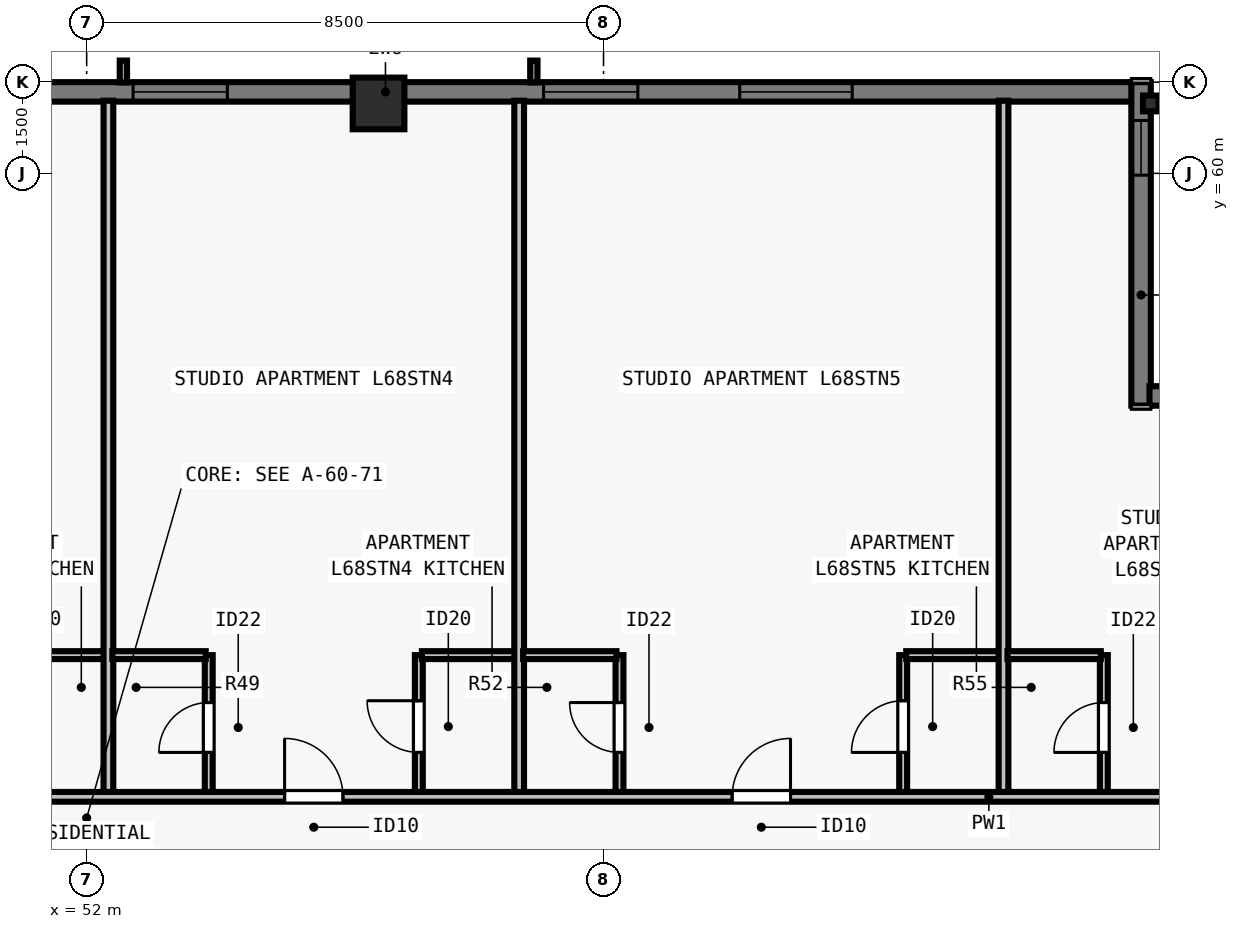
"""IFC4 building model, lengths in metres.
Left out: names, types, materials, properties, quantities, classifications, styles, units other than length and angle.
Written with IfcOpenShell. Run it as: python <this file> out.ifc"""

import sys

from ifc_helpers import new_model, si_unit, direction, frame, frame_2d, origin, origin_2d, place, context, subcontext, project, spatial, rectangle, i_section, extrude, element, fill, save


model = new_model("IFC4")
c1 = context("Model", 3, precision=1e-05, world=origin(), true_north=direction((0.0, 1.0)))
c2 = subcontext(c1, "Body", "Model", "MODEL_VIEW")
j1 = project(units=[si_unit("LENGTHUNIT", "METRE"), si_unit("PLANEANGLEUNIT", "RADIAN")], contexts=[c1])
p1 = place(None, origin())
s1 = spatial("IfcSite", under=j1, at=p1, CompositionType="ELEMENT")
p2 = place(p1, origin())
s2 = spatial("IfcBuilding", under=s1, at=p2, CompositionType="ELEMENT")
p3 = place(p2, frame((0.0, 0.0, 248.0)))
s3 = spatial("IfcBuildingStorey", under=s2, at=p3, CompositionType="ELEMENT", Elevation=248.0)
p4 = place(p3, frame((69.5, 61.15, 0.0), z_axis=(0.0, 0.0, 1.0), x_axis=(1.0, 0.0, 0.0)))
e1 = element("IfcColumn", 1, at=p4, inside=s3, PredefinedType="COLUMN", context=c2, shape_type="SweptSolid", body=[
    extrude(i_section(OverallWidth=0.256, OverallDepth=0.26, WebThickness=0.01, FlangeThickness=0.017, FilletRadius=0.013, at=origin_2d()), origin(), (0.0, 0.0, 1.0), 3.5),
])
p5 = place(p3, frame((56.8, 61.15, 0.0), z_axis=(0.0, 0.0, 1.0), x_axis=(1.0, 0.0, 0.0)))
e2 = element("IfcColumn", 2, at=p5, inside=s3, PredefinedType="COLUMN", context=c2, shape_type="SweptSolid", body=[
    extrude(rectangle(XDim=0.85, YDim=0.85, at=origin_2d()), origin(), (0.0, 0.0, 1.0), 3.5),
])
p6 = place(p3, frame((34.5, 61.34, 0.0), z_axis=(0.0, 0.0, 1.0), x_axis=(1.0, 0.0, 0.0)))
e3 = element("IfcWall", 3, at=p6, inside=s3, PredefinedType="SOLIDWALL", context=c2, shape_type="SweptSolid", body=[
    extrude(rectangle(XDim=34.702, YDim=0.32, at=frame_2d((17.351, 0.0))), origin(), (0.0, 0.0, 1.0), 3.29),
])
p7 = place(p6, frame((4.763, 0.0, 0.8)))
e4 = element("IfcOpeningElement", 4, at=p7, cuts=e3, PredefinedType="OPENING", context=c2, shape_type="SweptSolid", body=[
    extrude(rectangle(XDim=1.55, YDim=1.678, at=frame_2d((0.775, 0.839))), frame((0.0, 0.17, 0.0), z_axis=(0.0, -1.0, 0.0), x_axis=(1.0, 0.0, 0.0)), (0.0, 0.0, 1.0), 0.34),
])
p8 = place(p6, frame((7.538, 0.0, 0.8)))
e5 = element("IfcOpeningElement", 5, at=p8, cuts=e3, PredefinedType="OPENING", context=c2, shape_type="SweptSolid", body=[
    extrude(rectangle(XDim=1.85, YDim=1.678, at=frame_2d((0.925, 0.839))), frame((0.0, 0.17, 0.0), z_axis=(0.0, -1.0, 0.0), x_axis=(1.0, 0.0, 0.0)), (0.0, 0.0, 1.0), 0.34),
])
p9 = place(p6, frame((10.263, 0.0, 0.8)))
e6 = element("IfcOpeningElement", 6, at=p9, cuts=e3, PredefinedType="OPENING", context=c2, shape_type="SweptSolid", body=[
    extrude(rectangle(XDim=1.55, YDim=1.678, at=frame_2d((0.775, 0.839))), frame((0.0, 0.17, 0.0), z_axis=(0.0, -1.0, 0.0), x_axis=(1.0, 0.0, 0.0)), (0.0, 0.0, 1.0), 0.34),
])
p10 = place(p6, frame((14.738, 0.0, 0.8)))
e7 = element("IfcOpeningElement", 7, at=p10, cuts=e3, PredefinedType="OPENING", context=c2, shape_type="SweptSolid", body=[
    extrude(rectangle(XDim=1.85, YDim=1.678, at=frame_2d((0.925, 0.839))), frame((0.0, 0.17, 0.0), z_axis=(0.0, -1.0, 0.0), x_axis=(1.0, 0.0, 0.0)), (0.0, 0.0, 1.0), 0.34),
])
p11 = place(p6, frame((18.264, 0.0, 0.8)))
e8 = element("IfcOpeningElement", 8, at=p11, cuts=e3, PredefinedType="OPENING", context=c2, shape_type="SweptSolid", body=[
    extrude(rectangle(XDim=1.55, YDim=1.678, at=frame_2d((0.775, 0.839))), frame((0.0, 0.17, 0.0), z_axis=(0.0, -1.0, 0.0), x_axis=(1.0, 0.0, 0.0)), (0.0, 0.0, 1.0), 0.34),
])
p12 = place(p6, frame((25.014, 0.0, 0.8)))
e9 = element("IfcOpeningElement", 9, at=p12, cuts=e3, PredefinedType="OPENING", context=c2, shape_type="SweptSolid", body=[
    extrude(rectangle(XDim=1.55, YDim=1.678, at=frame_2d((0.775, 0.839))), frame((0.0, 0.17, 0.0), z_axis=(0.0, -1.0, 0.0), x_axis=(1.0, 0.0, 0.0)), (0.0, 0.0, 1.0), 0.34),
])
p13 = place(p6, frame((28.24, 0.0, 0.8)))
e10 = element("IfcOpeningElement", 10, at=p13, cuts=e3, PredefinedType="OPENING", context=c2, shape_type="SweptSolid", body=[
    extrude(rectangle(XDim=1.85, YDim=1.678, at=frame_2d((0.925, 0.839))), frame((0.0, 0.17, 0.0), z_axis=(0.0, -1.0, 0.0), x_axis=(1.0, 0.0, 0.0)), (0.0, 0.0, 1.0), 0.34),
])
p14 = place(p3, frame((69.34, 61.5, 0.0), z_axis=(0.0, 0.0, 1.0), x_axis=(0.0, -1.0, 0.0)))
e11 = element("IfcWall", 11, at=p14, inside=s3, PredefinedType="SOLIDWALL", context=c2, shape_type="SweptSolid", body=[
    extrude(rectangle(XDim=5.32, YDim=0.32, at=frame_2d((2.66, 0.0))), origin(), (0.0, 0.0, 1.0), 3.29),
])
p15 = place(p14, frame((0.63, 0.0, 0.8)))
e12 = element("IfcOpeningElement", 12, at=p15, cuts=e11, PredefinedType="OPENING", context=c2, shape_type="SweptSolid", body=[
    extrude(rectangle(XDim=0.9, YDim=1.678, at=frame_2d((0.45, 0.839))), frame((0.0, 0.17, 0.0), z_axis=(0.0, -1.0, 0.0), x_axis=(1.0, 0.0, 0.0)), (0.0, 0.0, 1.0), 0.34),
])
p16 = place(p3, frame((69.478, 56.34, 0.0), z_axis=(0.0, 0.0, 1.0), x_axis=(1.0, 0.0, 0.0)))
e13 = element("IfcWall", 13, at=p16, inside=s3, PredefinedType="SOLIDWALL", context=c2, shape_type="SweptSolid", body=[
    extrude(rectangle(XDim=4.724, YDim=0.32, at=frame_2d((2.362, 0.0))), origin(), (0.0, 0.0, 1.0), 3.29),
])
p17 = place(p3, frame((29.805, 49.748, 0.0), z_axis=(0.0, 0.0, 1.0), x_axis=(1.0, 0.0, 0.0)))
e14 = element("IfcWall", 14, at=p17, inside=s3, PredefinedType="PARTITIONING", context=c2, shape_type="SweptSolid", body=[
    extrude(rectangle(XDim=44.39, YDim=0.16, at=frame_2d((22.195, 0.0))), origin(), (0.0, 0.0, 1.0), 2.958),
])
p18 = place(p17, frame((3.494, 0.0, 0.0)))
e15 = element("IfcOpeningElement", 15, at=p18, cuts=e14, PredefinedType="OPENING", context=c2, shape_type="SweptSolid", body=[
    extrude(rectangle(XDim=0.96, YDim=2.18, at=frame_2d((0.48, 1.09))), frame((0.0, 0.09, 0.0), z_axis=(0.0, -1.0, 0.0), x_axis=(1.0, 0.0, 0.0)), (0.0, 0.0, 1.0), 0.18),
])
p19 = place(p17, frame((10.73, 0.0, 0.0)))
e16 = element("IfcOpeningElement", 16, at=p19, cuts=e14, PredefinedType="OPENING", context=c2, shape_type="SweptSolid", body=[
    extrude(rectangle(XDim=0.96, YDim=2.18, at=frame_2d((0.48, 1.09))), frame((0.0, 0.09, 0.0), z_axis=(0.0, -1.0, 0.0), x_axis=(1.0, 0.0, 0.0)), (0.0, 0.0, 1.0), 0.18),
])
p20 = place(p17, frame((18.09, 0.0, 0.0)))
e17 = element("IfcOpeningElement", 17, at=p20, cuts=e14, PredefinedType="OPENING", context=c2, shape_type="SweptSolid", body=[
    extrude(rectangle(XDim=0.96, YDim=2.18, at=frame_2d((0.48, 1.09))), frame((0.0, 0.09, 0.0), z_axis=(0.0, -1.0, 0.0), x_axis=(1.0, 0.0, 0.0)), (0.0, 0.0, 1.0), 0.18),
])
p21 = place(p17, frame((25.45, 0.0, 0.0)))
e18 = element("IfcOpeningElement", 18, at=p21, cuts=e14, PredefinedType="OPENING", context=c2, shape_type="SweptSolid", body=[
    extrude(rectangle(XDim=0.96, YDim=2.18, at=frame_2d((0.48, 1.09))), frame((0.0, 0.09, 0.0), z_axis=(0.0, -1.0, 0.0), x_axis=(1.0, 0.0, 0.0)), (0.0, 0.0, 1.0), 0.18),
])
p22 = place(p17, frame((32.81, 0.0, 0.0)))
e19 = element("IfcOpeningElement", 19, at=p22, cuts=e14, PredefinedType="OPENING", context=c2, shape_type="SweptSolid", body=[
    extrude(rectangle(XDim=0.96, YDim=2.18, at=frame_2d((0.48, 1.09))), frame((0.0, 0.09, 0.0), z_axis=(0.0, -1.0, 0.0), x_axis=(1.0, 0.0, 0.0)), (0.0, 0.0, 1.0), 0.18),
])
p23 = place(p17, frame((40.294, 0.0, 0.0)))
e20 = element("IfcOpeningElement", 20, at=p23, cuts=e14, PredefinedType="OPENING", context=c2, shape_type="SweptSolid", body=[
    extrude(rectangle(XDim=0.96, YDim=2.18, at=frame_2d((0.48, 1.09))), frame((0.0, 0.09, 0.0), z_axis=(0.0, -1.0, 0.0), x_axis=(1.0, 0.0, 0.0)), (0.0, 0.0, 1.0), 0.18),
])
p24 = place(p3, frame((50.758, 52.077, 0.0), z_axis=(0.0, 0.0, 1.0), x_axis=(1.0, 0.0, 0.0)))
e21 = element("IfcWall", 21, at=p24, inside=s3, PredefinedType="PLUMBINGWALL", context=c2, shape_type="SweptSolid", body=[
    extrude(rectangle(XDim=1.6, YDim=0.13, at=frame_2d((0.8, 0.0))), origin(), (0.0, 0.0, 1.0), 3.29),
])
p25 = place(p3, frame((52.357, 49.827, 0.0), z_axis=(0.0, 0.0, 1.0), x_axis=(0.0, 1.0, 0.0)))
e22 = element("IfcWall", 22, at=p25, inside=s3, PredefinedType="PARTITIONING", context=c2, shape_type="SweptSolid", body=[
    extrude(rectangle(XDim=11.368, YDim=0.16, at=frame_2d((5.684, 0.0))), origin(), (0.0, 0.0, 1.0), 2.958),
])
p26 = place(p3, frame((54.008, 49.827, 0.0), z_axis=(0.0, 0.0, 1.0), x_axis=(0.0, 1.0, 0.0)))
e23 = element("IfcWall", 23, at=p26, inside=s3, PredefinedType="PLUMBINGWALL", context=c2, shape_type="SweptSolid", body=[
    extrude(rectangle(XDim=2.25, YDim=0.13, at=frame_2d((1.125, 0.0))), origin(), (0.0, 0.0, 1.0), 3.29),
])
p27 = place(p26, frame((0.65, 0.0, 0.0)))
e24 = element("IfcOpeningElement", 24, at=p27, cuts=e23, PredefinedType="OPENING", context=c2, shape_type="SweptSolid", body=[
    extrude(rectangle(XDim=0.82, YDim=2.1, at=frame_2d((0.41, 1.05))), frame((0.0, 0.075, 0.0), z_axis=(0.0, -1.0, 0.0), x_axis=(1.0, 0.0, 0.0)), (0.0, 0.0, 1.0), 0.15),
])
p28 = place(p3, frame((52.423, 52.077, 0.0), z_axis=(0.0, 0.0, 1.0), x_axis=(1.0, 0.0, 0.0)))
e25 = element("IfcWall", 25, at=p28, inside=s3, PredefinedType="PLUMBINGWALL", context=c2, shape_type="SweptSolid", body=[
    extrude(rectangle(XDim=1.535, YDim=0.13, at=frame_2d((0.768, 0.0))), origin(), (0.0, 0.0, 1.0), 3.29),
])
p29 = place(p3, frame((57.462, 49.827, 0.0), z_axis=(0.0, 0.0, 1.0), x_axis=(0.0, 1.0, 0.0)))
e26 = element("IfcWall", 26, at=p29, inside=s3, PredefinedType="PLUMBINGWALL", context=c2, shape_type="SweptSolid", body=[
    extrude(rectangle(XDim=2.25, YDim=0.13, at=frame_2d((1.125, 0.0))), origin(), (0.0, 0.0, 1.0), 3.29),
])
p30 = place(p29, frame((0.65, 0.0, 0.0)))
e27 = element("IfcOpeningElement", 27, at=p30, cuts=e26, PredefinedType="OPENING", context=c2, shape_type="SweptSolid", body=[
    extrude(rectangle(XDim=0.85, YDim=2.1, at=frame_2d((0.425, 1.05))), frame((0.0, 0.075, 0.0), z_axis=(0.0, -1.0, 0.0), x_axis=(1.0, 0.0, 0.0)), (0.0, 0.0, 1.0), 0.15),
])
p31 = place(p3, frame((57.512, 52.077, 0.0), z_axis=(0.0, 0.0, 1.0), x_axis=(1.0, 0.0, 0.0)))
e28 = element("IfcWall", 28, at=p31, inside=s3, PredefinedType="PLUMBINGWALL", context=c2, shape_type="SweptSolid", body=[
    extrude(rectangle(XDim=1.6, YDim=0.13, at=frame_2d((0.8, 0.0))), origin(), (0.0, 0.0, 1.0), 3.29),
])
p32 = place(p3, frame((59.113, 49.827, 0.0), z_axis=(0.0, 0.0, 1.0), x_axis=(0.0, 1.0, 0.0)))
e29 = element("IfcWall", 29, at=p32, inside=s3, PredefinedType="PARTITIONING", context=c2, shape_type="SweptSolid", body=[
    extrude(rectangle(XDim=11.368, YDim=0.16, at=frame_2d((5.684, 0.0))), origin(), (0.0, 0.0, 1.0), 3.29),
])
p33 = place(p3, frame((60.762, 49.827, 0.0), z_axis=(0.0, 0.0, 1.0), x_axis=(0.0, 1.0, 0.0)))
e30 = element("IfcWall", 30, at=p33, inside=s3, PredefinedType="PLUMBINGWALL", context=c2, shape_type="SweptSolid", body=[
    extrude(rectangle(XDim=2.25, YDim=0.13, at=frame_2d((1.125, 0.0))), origin(), (0.0, 0.0, 1.0), 3.29),
])
p34 = place(p33, frame((0.65, 0.0, 0.0)))
e31 = element("IfcOpeningElement", 31, at=p34, cuts=e30, PredefinedType="OPENING", context=c2, shape_type="SweptSolid", body=[
    extrude(rectangle(XDim=0.82, YDim=2.1, at=frame_2d((0.41, 1.05))), frame((0.0, 0.075, 0.0), z_axis=(0.0, -1.0, 0.0), x_axis=(1.0, 0.0, 0.0)), (0.0, 0.0, 1.0), 0.15),
])
p35 = place(p3, frame((59.177, 52.077, 0.0), z_axis=(0.0, 0.0, 1.0), x_axis=(1.0, 0.0, 0.0)))
e32 = element("IfcWall", 32, at=p35, inside=s3, PredefinedType="PLUMBINGWALL", context=c2, shape_type="SweptSolid", body=[
    extrude(rectangle(XDim=1.535, YDim=0.13, at=frame_2d((0.768, 0.0))), origin(), (0.0, 0.0, 1.0), 3.29),
])
p36 = place(p3, frame((65.427, 49.827, 0.0), z_axis=(0.0, 0.0, 1.0), x_axis=(0.0, 1.0, 0.0)))
e33 = element("IfcWall", 33, at=p36, inside=s3, PredefinedType="PLUMBINGWALL", context=c2, shape_type="SweptSolid", body=[
    extrude(rectangle(XDim=2.25, YDim=0.13, at=frame_2d((1.125, 0.0))), origin(), (0.0, 0.0, 1.0), 3.29),
])
p37 = place(p36, frame((0.65, 0.0, 0.0)))
e34 = element("IfcOpeningElement", 34, at=p37, cuts=e33, PredefinedType="OPENING", context=c2, shape_type="SweptSolid", body=[
    extrude(rectangle(XDim=0.85, YDim=2.1, at=frame_2d((0.425, 1.05))), frame((0.0, 0.075, 0.0), z_axis=(0.0, -1.0, 0.0), x_axis=(1.0, 0.0, 0.0)), (0.0, 0.0, 1.0), 0.15),
])
p38 = place(p3, frame((65.478, 52.077, 0.0), z_axis=(0.0, 0.0, 1.0), x_axis=(1.0, 0.0, 0.0)))
e35 = element("IfcWall", 35, at=p38, inside=s3, PredefinedType="PLUMBINGWALL", context=c2, shape_type="SweptSolid", body=[
    extrude(rectangle(XDim=1.6, YDim=0.13, at=frame_2d((0.8, 0.0))), origin(), (0.0, 0.0, 1.0), 3.29),
])
p39 = place(p3, frame((67.077, 49.827, 0.0), z_axis=(0.0, 0.0, 1.0), x_axis=(0.0, 1.0, 0.0)))
e36 = element("IfcWall", 36, at=p39, inside=s3, PredefinedType="PARTITIONING", context=c2, shape_type="SweptSolid", body=[
    extrude(rectangle(XDim=11.368, YDim=0.16, at=frame_2d((5.684, 0.0))), origin(), (0.0, 0.0, 1.0), 2.573),
])
p40 = place(p3, frame((68.728, 49.827, 0.0), z_axis=(0.0, 0.0, 1.0), x_axis=(0.0, 1.0, 0.0)))
e37 = element("IfcWall", 37, at=p40, inside=s3, PredefinedType="PLUMBINGWALL", context=c2, shape_type="SweptSolid", body=[
    extrude(rectangle(XDim=2.25, YDim=0.13, at=frame_2d((1.125, 0.0))), origin(), (0.0, 0.0, 1.0), 3.29),
])
p41 = place(p40, frame((0.65, 0.0, 0.0)))
e38 = element("IfcOpeningElement", 38, at=p41, cuts=e37, PredefinedType="OPENING", context=c2, shape_type="SweptSolid", body=[
    extrude(rectangle(XDim=0.82, YDim=2.1, at=frame_2d((0.41, 1.05))), frame((0.0, 0.075, 0.0), z_axis=(0.0, -1.0, 0.0), x_axis=(1.0, 0.0, 0.0)), (0.0, 0.0, 1.0), 0.15),
])
p42 = place(p3, frame((67.143, 52.077, 0.0), z_axis=(0.0, 0.0, 1.0), x_axis=(1.0, 0.0, 0.0)))
e39 = element("IfcWall", 39, at=p42, inside=s3, PredefinedType="PLUMBINGWALL", context=c2, shape_type="SweptSolid", body=[
    extrude(rectangle(XDim=1.535, YDim=0.13, at=frame_2d((0.768, 0.0))), origin(), (0.0, 0.0, 1.0), 2.958),
])
p43 = place(p11, origin())
e40 = element("IfcWindow", 40, at=p43, inside=s3, PartitioningType="SINGLE_PANEL", PredefinedType="WINDOW", context=c2, shape_type="SweptSolid", body=[
    extrude(rectangle(XDim=1.55, YDim=1.678, at=frame_2d((0.775, 0.839))), frame((0.0, -0.05, 0.0), z_axis=(0.0, -1.0, 0.0), x_axis=(1.0, 0.0, 0.0)), (0.0, 0.0, 1.0), 0.06),
])
fill(e8, e40)
p44 = place(p12, origin())
e41 = element("IfcWindow", 41, at=p44, inside=s3, PartitioningType="SINGLE_PANEL", PredefinedType="WINDOW", context=c2, shape_type="SweptSolid", body=[
    extrude(rectangle(XDim=1.55, YDim=1.678, at=frame_2d((0.775, 0.839))), frame((0.0, -0.05, 0.0), z_axis=(0.0, -1.0, 0.0), x_axis=(1.0, 0.0, 0.0)), (0.0, 0.0, 1.0), 0.06),
])
fill(e9, e41)
p45 = place(p13, origin())
e42 = element("IfcWindow", 42, at=p45, inside=s3, PartitioningType="SINGLE_PANEL", PredefinedType="WINDOW", context=c2, shape_type="SweptSolid", body=[
    extrude(rectangle(XDim=1.85, YDim=1.678, at=frame_2d((0.925, 0.839))), frame((0.0, -0.05, 0.0), z_axis=(0.0, -1.0, 0.0), x_axis=(1.0, 0.0, 0.0)), (0.0, 0.0, 1.0), 0.06),
])
fill(e10, e42)
p46 = place(p15, origin())
e43 = element("IfcWindow", 43, at=p46, inside=s3, PartitioningType="SINGLE_PANEL", PredefinedType="WINDOW", context=c2, shape_type="SweptSolid", body=[
    extrude(rectangle(XDim=0.9, YDim=1.678, at=frame_2d((0.45, 0.839))), frame((0.0, -0.04, 0.0), z_axis=(0.0, -1.0, 0.0), x_axis=(1.0, 0.0, 0.0)), (0.0, 0.0, 1.0), 0.06),
])
fill(e12, e43)
p47 = place(p27, origin())
e44 = element("IfcDoor", 44, at=p47, inside=s3, OperationType="SINGLE_SWING_LEFT", PredefinedType="DOOR", context=c2, shape_type="SweptSolid", body=[
    extrude(rectangle(XDim=0.82, YDim=2.1, at=frame_2d((0.41, 1.05))), frame((0.0, 0.025, 0.0), z_axis=(0.0, -1.0, 0.0), x_axis=(1.0, 0.0, 0.0)), (0.0, 0.0, 1.0), 0.05),
])
fill(e24, e44)
p48 = place(p30, origin())
e45 = element("IfcDoor", 45, at=p48, inside=s3, OperationType="SINGLE_SWING_RIGHT", PredefinedType="DOOR", context=c2, shape_type="SweptSolid", body=[
    extrude(rectangle(XDim=0.85, YDim=2.1, at=frame_2d((0.425, 1.05))), frame((0.0, 0.025, 0.0), z_axis=(0.0, -1.0, 0.0), x_axis=(1.0, 0.0, 0.0)), (0.0, 0.0, 1.0), 0.05),
])
fill(e27, e45)
p49 = place(p21, origin())
e46 = element("IfcDoor", 46, at=p49, inside=s3, OperationType="SINGLE_SWING_LEFT", PredefinedType="DOOR", context=c2, shape_type="SweptSolid", body=[
    extrude(rectangle(XDim=0.96, YDim=2.18, at=frame_2d((0.48, 1.09))), frame((0.0, 0.025, 0.0), z_axis=(0.0, -1.0, 0.0), x_axis=(1.0, 0.0, 0.0)), (0.0, 0.0, 1.0), 0.05),
])
fill(e18, e46)
p50 = place(p34, origin())
e47 = element("IfcDoor", 47, at=p50, inside=s3, OperationType="SINGLE_SWING_RIGHT", PredefinedType="DOOR", context=c2, shape_type="SweptSolid", body=[
    extrude(rectangle(XDim=0.82, YDim=2.1, at=frame_2d((0.41, 1.05))), frame((0.0, 0.025, 0.0), z_axis=(0.0, -1.0, 0.0), x_axis=(1.0, 0.0, 0.0)), (0.0, 0.0, 1.0), 0.05),
])
fill(e31, e47)
p51 = place(p37, origin())
e48 = element("IfcDoor", 48, at=p51, inside=s3, OperationType="SINGLE_SWING_LEFT", PredefinedType="DOOR", context=c2, shape_type="SweptSolid", body=[
    extrude(rectangle(XDim=0.85, YDim=2.1, at=frame_2d((0.425, 1.05))), frame((0.0, 0.025, 0.0), z_axis=(0.0, -1.0, 0.0), x_axis=(1.0, 0.0, 0.0)), (0.0, 0.0, 1.0), 0.05),
])
fill(e34, e48)
p52 = place(p22, origin())
e49 = element("IfcDoor", 49, at=p52, inside=s3, OperationType="SINGLE_SWING_RIGHT", PredefinedType="DOOR", context=c2, shape_type="SweptSolid", body=[
    extrude(rectangle(XDim=0.96, YDim=2.18, at=frame_2d((0.48, 1.09))), frame((0.0, 0.025, 0.0), z_axis=(0.0, -1.0, 0.0), x_axis=(1.0, 0.0, 0.0)), (0.0, 0.0, 1.0), 0.05),
])
fill(e19, e49)
p53 = place(p41, origin())
e50 = element("IfcDoor", 50, at=p53, inside=s3, OperationType="SINGLE_SWING_LEFT", PredefinedType="DOOR", context=c2, shape_type="SweptSolid", body=[
    extrude(rectangle(XDim=0.82, YDim=2.1, at=frame_2d((0.41, 1.05))), frame((0.0, 0.025, 0.0), z_axis=(0.0, -1.0, 0.0), x_axis=(1.0, 0.0, 0.0)), (0.0, 0.0, 1.0), 0.05),
])
fill(e38, e50)
save(model, sys.argv[1])
